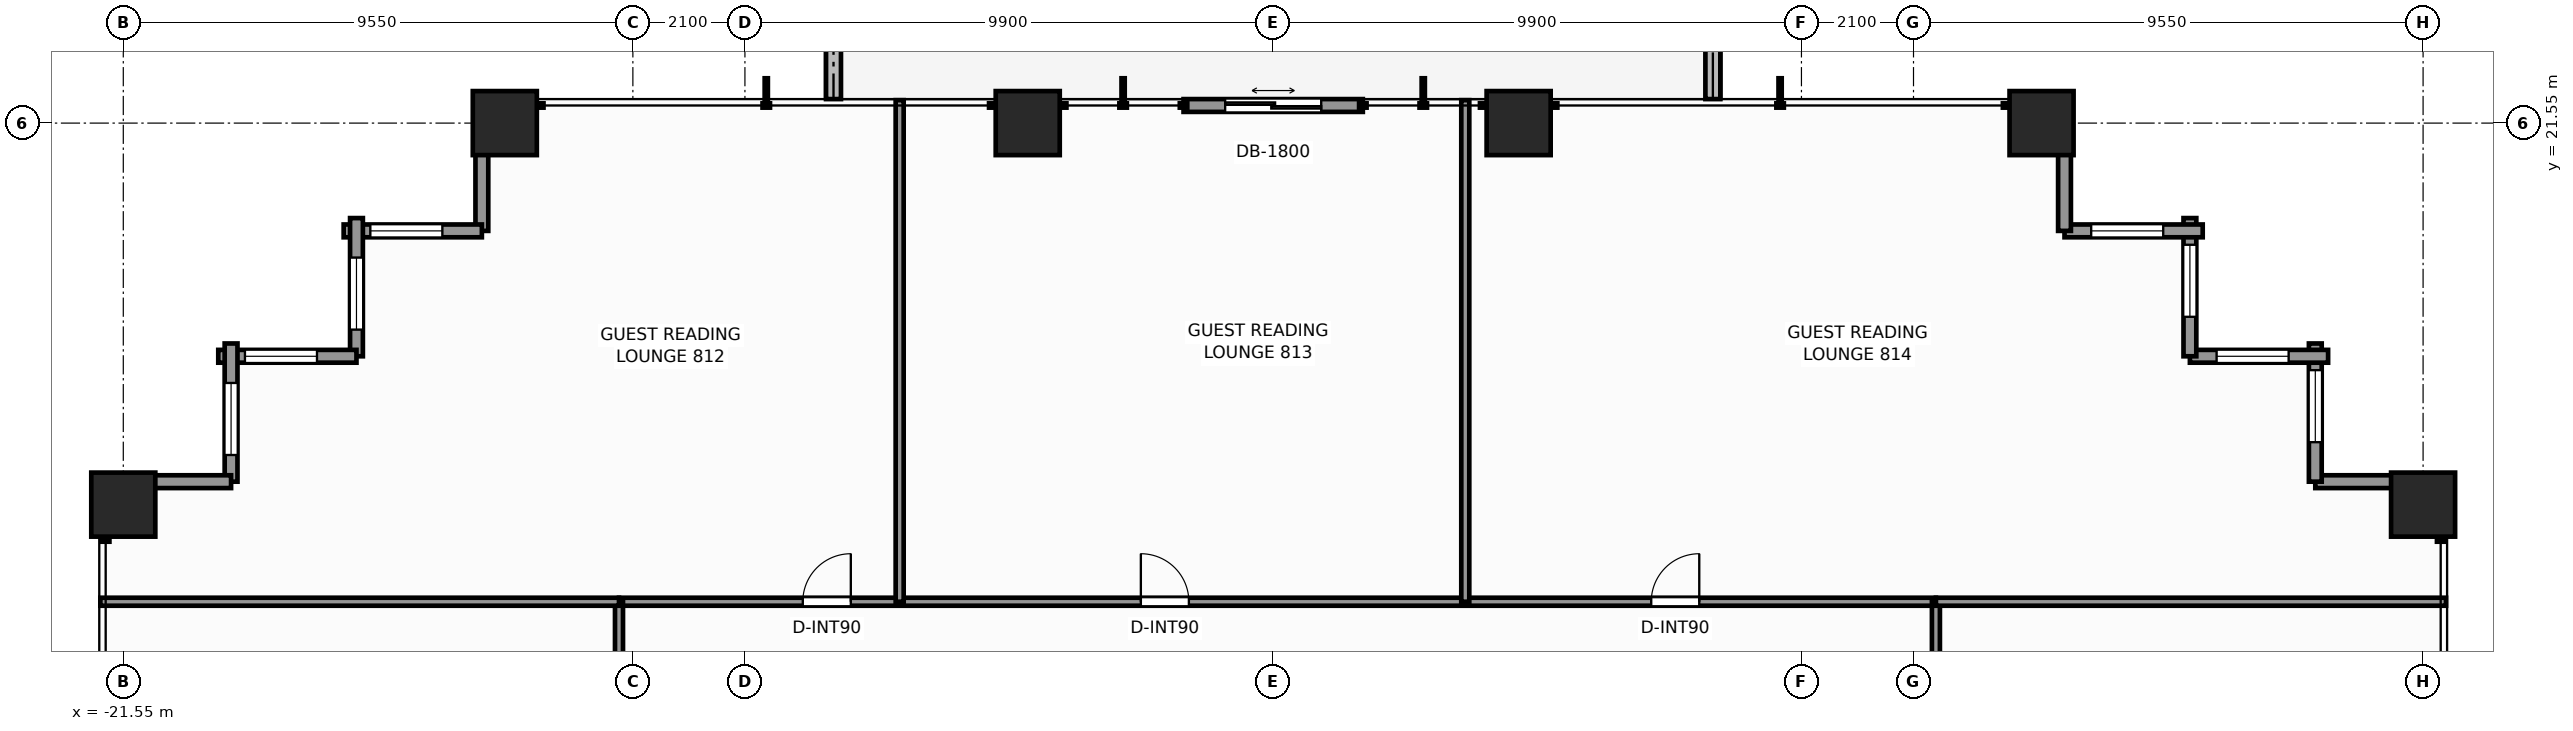
"""IFC4 building model, lengths in metres.
Left out: names, types, materials, properties, quantities, classifications, styles, units other than length and angle.
Written with IfcOpenShell. Run it as: python <this file> out.ifc"""

import sys

from ifc_helpers import new_model, si_unit, direction, frame, frame_2d, origin, origin_2d, place, context, subcontext, project, spatial, rectangle, extrude, element, fill, save


model = new_model("IFC4")
c1 = context("Model", 3, precision=1e-05, world=origin(), true_north=direction((0.0, 1.0)))
c2 = subcontext(c1, "Body", "Model", "MODEL_VIEW")
j1 = project(units=[si_unit("LENGTHUNIT", "METRE"), si_unit("PLANEANGLEUNIT", "RADIAN")], contexts=[c1])
p1 = place(None, origin())
s1 = spatial("IfcSite", under=j1, at=p1, CompositionType="ELEMENT")
p2 = place(p1, origin())
s2 = spatial("IfcBuilding", under=s1, at=p2, CompositionType="ELEMENT")
p3 = place(p2, frame((0.0, 0.0, 30.4)))
s3 = spatial("IfcBuildingStorey", under=s2, at=p3, CompositionType="ELEMENT", Elevation=30.4)
for number, where, z_axis, x_axis in (
    (1, (-14.4, 21.55, 0.0), (0.0, 0.0, 1.0), (1.0, 0.0, 0.0)),
    (2, (-4.6, 21.55, 0.0), (0.0, 0.0, 1.0), (1.0, 0.0, 0.0)),
    (3, (4.6, 21.55, 0.0), (0.0, 0.0, 1.0), (1.0, 0.0, 0.0)),
    (4, (14.4, 21.55, 0.0), (0.0, 0.0, 1.0), (1.0, 0.0, 0.0)),
    (5, (-21.55, 14.4, 0.0), (0.0, 0.0, 1.0), (1.0, 0.0, 0.0)),
    (6, (21.55, 14.4, 0.0), (0.0, 0.0, 1.0), (1.0, 0.0, 0.0)),
):
    element("IfcColumn", number, at=place(p3, frame(where, z_axis=z_axis, x_axis=x_axis)), inside=s3, PredefinedType="COLUMN", context=c2, shape_type="SweptSolid", body=[
        extrude(rectangle(XDim=1.2, YDim=1.2, at=origin_2d()), origin(), (0.0, 0.0, 1.0), 3.3),
    ])
p4 = place(p3, frame((8.24, 22.0, -0.06), z_axis=(0.0, 0.0, 1.0), x_axis=(0.0, 1.0, 0.0)))
e7 = element("IfcWall", 7, at=p4, inside=s3, PredefinedType="PARAPET", context=c2, shape_type="SweptSolid", body=[
    extrude(rectangle(XDim=2.34, YDim=0.28, at=frame_2d((1.17, 0.0))), origin(), (0.0, 0.0, 1.0), 0.42),
])
p5 = place(p3, frame((-8.24, 25.367, -0.06), z_axis=(0.0, 0.0, 1.0), x_axis=(0.0, -1.0, 0.0)))
e8 = element("IfcWall", 8, at=p5, inside=s3, PredefinedType="PARAPET", context=c2, shape_type="SweptSolid", body=[
    extrude(rectangle(XDim=3.367, YDim=0.28, at=frame_2d((1.684, 0.0))), origin(), (0.0, 0.0, 1.0), 0.42),
])
p6 = place(p3, frame((19.53, 14.83, 0.0), z_axis=(0.0, 0.0, 1.0), x_axis=(1.0, 0.0, 0.0)))
e9 = element("IfcWall", 9, at=p6, inside=s3, PredefinedType="STANDARD", context=c2, shape_type="SweptSolid", body=[
    extrude(rectangle(XDim=2.59, YDim=0.24, at=frame_2d((1.295, 0.0))), origin(), (0.0, 0.0, 1.0), 2.439),
])
p7 = place(p3, frame((19.53, 17.42, 0.0), z_axis=(0.0, 0.0, 1.0), x_axis=(0.0, -1.0, 0.0)))
e10 = element("IfcWall", 10, at=p7, inside=s3, PredefinedType="STANDARD", context=c2, shape_type="SweptSolid", body=[
    extrude(rectangle(XDim=2.59, YDim=0.24, at=frame_2d((1.295, 0.0))), origin(), (0.0, 0.0, 1.0), 2.439),
])
p8 = place(p7, frame((0.5, 0.0, 0.65)))
e11 = element("IfcOpeningElement", 11, at=p8, cuts=e10, PredefinedType="OPENING", context=c2, shape_type="SweptSolid", body=[
    extrude(rectangle(XDim=1.35, YDim=1.55, at=frame_2d((0.675, 0.775))), frame((0.0, 0.13, 0.0), z_axis=(0.0, -1.0, 0.0), x_axis=(1.0, 0.0, 0.0)), (0.0, 0.0, 1.0), 0.26),
])
p9 = place(p3, frame((17.18, 17.18, 0.0), z_axis=(0.0, 0.0, 1.0), x_axis=(1.0, 0.0, 0.0)))
e12 = element("IfcWall", 12, at=p9, inside=s3, PredefinedType="STANDARD", context=c2, shape_type="SweptSolid", body=[
    extrude(rectangle(XDim=2.59, YDim=0.24, at=frame_2d((1.295, 0.0))), origin(), (0.0, 0.0, 1.0), 2.439),
])
p10 = place(p9, frame((0.5, 0.0, 0.65)))
e13 = element("IfcOpeningElement", 13, at=p10, cuts=e12, PredefinedType="OPENING", context=c2, shape_type="SweptSolid", body=[
    extrude(rectangle(XDim=1.35, YDim=1.55, at=frame_2d((0.675, 0.775))), frame((0.0, 0.13, 0.0), z_axis=(0.0, -1.0, 0.0), x_axis=(1.0, 0.0, 0.0)), (0.0, 0.0, 1.0), 0.26),
])
p11 = place(p3, frame((17.18, 19.77, 0.0), z_axis=(0.0, 0.0, 1.0), x_axis=(0.0, -1.0, 0.0)))
e14 = element("IfcWall", 14, at=p11, inside=s3, PredefinedType="STANDARD", context=c2, shape_type="SweptSolid", body=[
    extrude(rectangle(XDim=2.59, YDim=0.24, at=frame_2d((1.295, 0.0))), origin(), (0.0, 0.0, 1.0), 2.439),
])
p12 = place(p11, frame((0.5, 0.0, 0.65)))
e15 = element("IfcOpeningElement", 15, at=p12, cuts=e14, PredefinedType="OPENING", context=c2, shape_type="SweptSolid", body=[
    extrude(rectangle(XDim=1.35, YDim=1.55, at=frame_2d((0.675, 0.775))), frame((0.0, 0.13, 0.0), z_axis=(0.0, -1.0, 0.0), x_axis=(1.0, 0.0, 0.0)), (0.0, 0.0, 1.0), 0.26),
])
p13 = place(p3, frame((14.83, 19.53, 0.0), z_axis=(0.0, 0.0, 1.0), x_axis=(1.0, 0.0, 0.0)))
e16 = element("IfcWall", 16, at=p13, inside=s3, PredefinedType="STANDARD", context=c2, shape_type="SweptSolid", body=[
    extrude(rectangle(XDim=2.59, YDim=0.24, at=frame_2d((1.295, 0.0))), origin(), (0.0, 0.0, 1.0), 2.439),
])
p14 = place(p13, frame((0.5, 0.0, 0.65)))
e17 = element("IfcOpeningElement", 17, at=p14, cuts=e16, PredefinedType="OPENING", context=c2, shape_type="SweptSolid", body=[
    extrude(rectangle(XDim=1.35, YDim=1.55, at=frame_2d((0.675, 0.775))), frame((0.0, 0.13, 0.0), z_axis=(0.0, -1.0, 0.0), x_axis=(1.0, 0.0, 0.0)), (0.0, 0.0, 1.0), 0.26),
])
p15 = place(p3, frame((14.83, 22.12, 0.0), z_axis=(0.0, 0.0, 1.0), x_axis=(0.0, -1.0, 0.0)))
e18 = element("IfcWall", 18, at=p15, inside=s3, PredefinedType="STANDARD", context=c2, shape_type="SweptSolid", body=[
    extrude(rectangle(XDim=2.59, YDim=0.24, at=frame_2d((1.295, 0.0))), origin(), (0.0, 0.0, 1.0), 2.439),
])
p16 = place(p3, frame((-1.68, 21.88, 0.0), z_axis=(0.0, 0.0, 1.0), x_axis=(1.0, 0.0, 0.0)))
e19 = element("IfcWall", 19, at=p16, inside=s3, PredefinedType="STANDARD", context=c2, shape_type="SweptSolid", body=[
    extrude(rectangle(XDim=3.36, YDim=0.24, at=frame_2d((1.68, 0.0))), origin(), (0.0, 0.0, 1.0), 3.06),
])
p17 = place(p16, frame((0.78, 0.0, 0.0)))
e20 = element("IfcOpeningElement", 20, at=p17, cuts=e19, PredefinedType="OPENING", context=c2, shape_type="SweptSolid", body=[
    extrude(rectangle(XDim=1.8, YDim=2.2, at=frame_2d((0.9, 1.1))), frame((0.0, 0.13, 0.0), z_axis=(0.0, -1.0, 0.0), x_axis=(1.0, 0.0, 0.0)), (0.0, 0.0, 1.0), 0.26),
])
p18 = place(p3, frame((-14.83, 19.53, 0.0), z_axis=(0.0, 0.0, 1.0), x_axis=(0.0, 1.0, 0.0)))
e21 = element("IfcWall", 21, at=p18, inside=s3, PredefinedType="STANDARD", context=c2, shape_type="SweptSolid", body=[
    extrude(rectangle(XDim=2.59, YDim=0.24, at=frame_2d((1.295, 0.0))), origin(), (0.0, 0.0, 1.0), 2.439),
])
p19 = place(p3, frame((-17.42, 19.53, 0.0), z_axis=(0.0, 0.0, 1.0), x_axis=(1.0, 0.0, 0.0)))
e22 = element("IfcWall", 22, at=p19, inside=s3, PredefinedType="STANDARD", context=c2, shape_type="SweptSolid", body=[
    extrude(rectangle(XDim=2.59, YDim=0.24, at=frame_2d((1.295, 0.0))), origin(), (0.0, 0.0, 1.0), 2.439),
])
p20 = place(p19, frame((0.5, 0.0, 0.65)))
e23 = element("IfcOpeningElement", 23, at=p20, cuts=e22, PredefinedType="OPENING", context=c2, shape_type="SweptSolid", body=[
    extrude(rectangle(XDim=1.35, YDim=1.55, at=frame_2d((0.675, 0.775))), frame((0.0, 0.13, 0.0), z_axis=(0.0, -1.0, 0.0), x_axis=(1.0, 0.0, 0.0)), (0.0, 0.0, 1.0), 0.26),
])
p21 = place(p3, frame((-17.18, 17.18, 0.0), z_axis=(0.0, 0.0, 1.0), x_axis=(0.0, 1.0, 0.0)))
e24 = element("IfcWall", 24, at=p21, inside=s3, PredefinedType="STANDARD", context=c2, shape_type="SweptSolid", body=[
    extrude(rectangle(XDim=2.59, YDim=0.24, at=frame_2d((1.295, 0.0))), origin(), (0.0, 0.0, 1.0), 2.439),
])
p22 = place(p21, frame((0.5, 0.0, 0.65)))
e25 = element("IfcOpeningElement", 25, at=p22, cuts=e24, PredefinedType="OPENING", context=c2, shape_type="SweptSolid", body=[
    extrude(rectangle(XDim=1.35, YDim=1.55, at=frame_2d((0.675, 0.775))), frame((0.0, 0.13, 0.0), z_axis=(0.0, -1.0, 0.0), x_axis=(1.0, 0.0, 0.0)), (0.0, 0.0, 1.0), 0.26),
])
p23 = place(p3, frame((-19.77, 17.18, 0.0), z_axis=(0.0, 0.0, 1.0), x_axis=(1.0, 0.0, 0.0)))
e26 = element("IfcWall", 26, at=p23, inside=s3, PredefinedType="STANDARD", context=c2, shape_type="SweptSolid", body=[
    extrude(rectangle(XDim=2.59, YDim=0.24, at=frame_2d((1.295, 0.0))), origin(), (0.0, 0.0, 1.0), 2.439),
])
p24 = place(p23, frame((0.5, 0.0, 0.65)))
e27 = element("IfcOpeningElement", 27, at=p24, cuts=e26, PredefinedType="OPENING", context=c2, shape_type="SweptSolid", body=[
    extrude(rectangle(XDim=1.35, YDim=1.55, at=frame_2d((0.675, 0.775))), frame((0.0, 0.13, 0.0), z_axis=(0.0, -1.0, 0.0), x_axis=(1.0, 0.0, 0.0)), (0.0, 0.0, 1.0), 0.26),
])
p25 = place(p3, frame((-19.53, 14.83, 0.0), z_axis=(0.0, 0.0, 1.0), x_axis=(0.0, 1.0, 0.0)))
e28 = element("IfcWall", 28, at=p25, inside=s3, PredefinedType="STANDARD", context=c2, shape_type="SweptSolid", body=[
    extrude(rectangle(XDim=2.59, YDim=0.24, at=frame_2d((1.295, 0.0))), origin(), (0.0, 0.0, 1.0), 2.439),
])
p26 = place(p25, frame((0.5, 0.0, 0.65)))
e29 = element("IfcOpeningElement", 29, at=p26, cuts=e28, PredefinedType="OPENING", context=c2, shape_type="SweptSolid", body=[
    extrude(rectangle(XDim=1.35, YDim=1.55, at=frame_2d((0.675, 0.775))), frame((0.0, 0.13, 0.0), z_axis=(0.0, -1.0, 0.0), x_axis=(1.0, 0.0, 0.0)), (0.0, 0.0, 1.0), 0.26),
])
p27 = place(p3, frame((-22.12, 14.83, 0.0), z_axis=(0.0, 0.0, 1.0), x_axis=(1.0, 0.0, 0.0)))
e30 = element("IfcWall", 30, at=p27, inside=s3, PredefinedType="STANDARD", context=c2, shape_type="SweptSolid", body=[
    extrude(rectangle(XDim=2.59, YDim=0.24, at=frame_2d((1.295, 0.0))), origin(), (0.0, 0.0, 1.0), 2.439),
])
p28 = place(p3, frame((-12.26, 12.58, 0.0), z_axis=(0.0, 0.0, 1.0), x_axis=(1.0, 0.0, 0.0)))
e31 = element("IfcWall", 31, at=p28, inside=s3, PredefinedType="PARTITIONING", context=c2, shape_type="SweptSolid", body=[
    extrude(rectangle(XDim=24.68, YDim=0.15, at=frame_2d((12.34, 0.0))), origin(), (0.0, 0.0, 1.0), 2.272),
])
p29 = place(p28, frame((3.444, 0.0, 0.0)))
e32 = element("IfcOpeningElement", 32, at=p29, cuts=e31, PredefinedType="OPENING", context=c2, shape_type="SweptSolid", body=[
    extrude(rectangle(XDim=0.9, YDim=2.06, at=frame_2d((0.45, 1.03))), frame((0.0, 0.085, 0.0), z_axis=(0.0, -1.0, 0.0), x_axis=(1.0, 0.0, 0.0)), (0.0, 0.0, 1.0), 0.17),
])
p30 = place(p28, frame((9.78, 0.0, 0.0)))
e33 = element("IfcOpeningElement", 33, at=p30, cuts=e31, PredefinedType="OPENING", context=c2, shape_type="SweptSolid", body=[
    extrude(rectangle(XDim=0.9, YDim=2.06, at=frame_2d((0.45, 1.03))), frame((0.0, 0.085, 0.0), z_axis=(0.0, -1.0, 0.0), x_axis=(1.0, 0.0, 0.0)), (0.0, 0.0, 1.0), 0.17),
])
p31 = place(p28, frame((19.345, 0.0, 0.0)))
e34 = element("IfcOpeningElement", 34, at=p31, cuts=e31, PredefinedType="OPENING", context=c2, shape_type="SweptSolid", body=[
    extrude(rectangle(XDim=0.9, YDim=2.06, at=frame_2d((0.45, 1.03))), frame((0.0, 0.085, 0.0), z_axis=(0.0, -1.0, 0.0), x_axis=(1.0, 0.0, 0.0)), (0.0, 0.0, 1.0), 0.17),
])
p32 = place(p3, frame((-12.26, -12.26, 0.0), z_axis=(0.0, 0.0, 1.0), x_axis=(0.0, 1.0, 0.0)))
e35 = element("IfcWall", 35, at=p32, inside=s3, PredefinedType="PARTITIONING", context=c2, shape_type="SweptSolid", body=[
    extrude(rectangle(XDim=24.84, YDim=0.15, at=frame_2d((12.42, 0.0))), origin(), (0.0, 0.0, 1.0), 2.272),
])
p33 = place(p32, frame((4.395, 0.0, 0.0)))
e36 = element("IfcOpeningElement", 36, at=p33, cuts=e35, PredefinedType="OPENING", context=c2, shape_type="SweptSolid", body=[
    extrude(rectangle(XDim=0.95, YDim=2.06, at=frame_2d((0.475, 1.03))), frame((0.0, 0.085, 0.0), z_axis=(0.0, -1.0, 0.0), x_axis=(1.0, 0.0, 0.0)), (0.0, 0.0, 1.0), 0.17),
])
p34 = place(p32, frame((13.815, 0.0, 0.0)))
e37 = element("IfcOpeningElement", 37, at=p34, cuts=e35, PredefinedType="OPENING", context=c2, shape_type="SweptSolid", body=[
    extrude(rectangle(XDim=0.95, YDim=2.06, at=frame_2d((0.475, 1.03))), frame((0.0, 0.085, 0.0), z_axis=(0.0, -1.0, 0.0), x_axis=(1.0, 0.0, 0.0)), (0.0, 0.0, 1.0), 0.17),
])
p35 = place(p32, frame((20.268, 0.0, 0.0)))
e38 = element("IfcOpeningElement", 38, at=p35, cuts=e35, PredefinedType="OPENING", context=c2, shape_type="SweptSolid", body=[
    extrude(rectangle(XDim=0.95, YDim=2.06, at=frame_2d((0.475, 1.03))), frame((0.0, 0.085, 0.0), z_axis=(0.0, -1.0, 0.0), x_axis=(1.0, 0.0, 0.0)), (0.0, 0.0, 1.0), 0.17),
])
p36 = place(p3, frame((12.42, -12.26, 0.0), z_axis=(0.0, 0.0, 1.0), x_axis=(0.0, 1.0, 0.0)))
e39 = element("IfcWall", 39, at=p36, inside=s3, PredefinedType="PARTITIONING", context=c2, shape_type="SweptSolid", body=[
    extrude(rectangle(XDim=24.84, YDim=0.15, at=frame_2d((12.42, 0.0))), origin(), (0.0, 0.0, 1.0), 2.272),
])
p37 = place(p36, frame((4.099, 0.0, 0.0)))
e40 = element("IfcOpeningElement", 40, at=p37, cuts=e39, PredefinedType="OPENING", context=c2, shape_type="SweptSolid", body=[
    extrude(rectangle(XDim=0.95, YDim=2.06, at=frame_2d((0.475, 1.03))), frame((0.0, 0.085, 0.0), z_axis=(0.0, -1.0, 0.0), x_axis=(1.0, 0.0, 0.0)), (0.0, 0.0, 1.0), 0.17),
])
p38 = place(p36, frame((13.577, 0.0, 0.0)))
e41 = element("IfcOpeningElement", 41, at=p38, cuts=e39, PredefinedType="OPENING", context=c2, shape_type="SweptSolid", body=[
    extrude(rectangle(XDim=0.95, YDim=2.06, at=frame_2d((0.475, 1.03))), frame((0.0, 0.085, 0.0), z_axis=(0.0, -1.0, 0.0), x_axis=(1.0, 0.0, 0.0)), (0.0, 0.0, 1.0), 0.17),
])
p39 = place(p36, frame((19.692, 0.0, 0.0)))
e42 = element("IfcOpeningElement", 42, at=p39, cuts=e39, PredefinedType="OPENING", context=c2, shape_type="SweptSolid", body=[
    extrude(rectangle(XDim=0.95, YDim=2.06, at=frame_2d((0.475, 1.03))), frame((0.0, 0.085, 0.0), z_axis=(0.0, -1.0, 0.0), x_axis=(1.0, 0.0, 0.0)), (0.0, 0.0, 1.0), 0.17),
])
p40 = place(p3, frame((-21.98, 12.58, 0.0), z_axis=(0.0, 0.0, 1.0), x_axis=(1.0, 0.0, 0.0)))
e43 = element("IfcWall", 43, at=p40, inside=s3, PredefinedType="PARTITIONING", context=c2, shape_type="SweptSolid", body=[
    extrude(rectangle(XDim=9.72, YDim=0.15, at=frame_2d((4.86, 0.0))), origin(), (0.0, 0.0, 1.0), 2.272),
])
p41 = place(p3, frame((12.42, 12.58, 0.0), z_axis=(0.0, 0.0, 1.0), x_axis=(1.0, 0.0, 0.0)))
e44 = element("IfcWall", 44, at=p41, inside=s3, PredefinedType="PARTITIONING", context=c2, shape_type="SweptSolid", body=[
    extrude(rectangle(XDim=9.56, YDim=0.15, at=frame_2d((4.78, 0.0))), origin(), (0.0, 0.0, 1.0), 2.272),
])
for number, where, z_axis, x_axis in (
    (45, (-7.0, 12.58, 0.0), (0.0, 0.0, 1.0), (0.0, 1.0, 0.0)),
    (46, (3.6, 12.58, 0.0), (0.0, 0.0, 1.0), (0.0, 1.0, 0.0)),
):
    element("IfcWall", number, at=place(p3, frame(where, z_axis=z_axis, x_axis=x_axis)), inside=s3, PredefinedType="PARTITIONING", context=c2, shape_type="SweptSolid", body=[
        extrude(rectangle(XDim=9.4, YDim=0.15, at=frame_2d((4.7, 0.0))), origin(), (0.0, 0.0, 1.0), 2.429),
    ])
p42 = place(p8, origin())
e47 = element("IfcWindow", 47, at=p42, inside=s3, PartitioningType="SINGLE_PANEL", PredefinedType="WINDOW", context=c2, shape_type="SweptSolid", body=[
    extrude(rectangle(XDim=1.35, YDim=1.55, at=frame_2d((0.675, 0.775))), frame((0.0, 0.03, 0.0), z_axis=(0.0, -1.0, 0.0), x_axis=(1.0, 0.0, 0.0)), (0.0, 0.0, 1.0), 0.06),
])
fill(e11, e47)
p43 = place(p10, origin())
e48 = element("IfcWindow", 48, at=p43, inside=s3, PartitioningType="SINGLE_PANEL", PredefinedType="WINDOW", context=c2, shape_type="SweptSolid", body=[
    extrude(rectangle(XDim=1.35, YDim=1.55, at=frame_2d((0.675, 0.775))), frame((0.0, 0.03, 0.0), z_axis=(0.0, -1.0, 0.0), x_axis=(1.0, 0.0, 0.0)), (0.0, 0.0, 1.0), 0.06),
])
fill(e13, e48)
p44 = place(p12, origin())
e49 = element("IfcWindow", 49, at=p44, inside=s3, PartitioningType="SINGLE_PANEL", PredefinedType="WINDOW", context=c2, shape_type="SweptSolid", body=[
    extrude(rectangle(XDim=1.35, YDim=1.55, at=frame_2d((0.675, 0.775))), frame((0.0, 0.03, 0.0), z_axis=(0.0, -1.0, 0.0), x_axis=(1.0, 0.0, 0.0)), (0.0, 0.0, 1.0), 0.06),
])
fill(e15, e49)
p45 = place(p14, origin())
e50 = element("IfcWindow", 50, at=p45, inside=s3, PartitioningType="SINGLE_PANEL", PredefinedType="WINDOW", context=c2, shape_type="SweptSolid", body=[
    extrude(rectangle(XDim=1.35, YDim=1.55, at=frame_2d((0.675, 0.775))), frame((0.0, 0.03, 0.0), z_axis=(0.0, -1.0, 0.0), x_axis=(1.0, 0.0, 0.0)), (0.0, 0.0, 1.0), 0.06),
])
fill(e17, e50)
p46 = place(p17, origin())
e51 = element("IfcDoor", 51, at=p46, inside=s3, OperationType="DOUBLE_DOOR_SLIDING", PredefinedType="DOOR", context=c2, shape_type="SweptSolid", body=[
    extrude(rectangle(XDim=1.8, YDim=2.2, at=frame_2d((0.9, 1.1))), frame((0.0, 0.025, 0.0), z_axis=(0.0, -1.0, 0.0), x_axis=(1.0, 0.0, 0.0)), (0.0, 0.0, 1.0), 0.05),
])
fill(e20, e51)
p47 = place(p20, origin())
e52 = element("IfcWindow", 52, at=p47, inside=s3, PartitioningType="SINGLE_PANEL", PredefinedType="WINDOW", context=c2, shape_type="SweptSolid", body=[
    extrude(rectangle(XDim=1.35, YDim=1.55, at=frame_2d((0.675, 0.775))), frame((0.0, 0.03, 0.0), z_axis=(0.0, -1.0, 0.0), x_axis=(1.0, 0.0, 0.0)), (0.0, 0.0, 1.0), 0.06),
])
fill(e23, e52)
p48 = place(p22, origin())
e53 = element("IfcWindow", 53, at=p48, inside=s3, PartitioningType="SINGLE_PANEL", PredefinedType="WINDOW", context=c2, shape_type="SweptSolid", body=[
    extrude(rectangle(XDim=1.35, YDim=1.55, at=frame_2d((0.675, 0.775))), frame((0.0, 0.03, 0.0), z_axis=(0.0, -1.0, 0.0), x_axis=(1.0, 0.0, 0.0)), (0.0, 0.0, 1.0), 0.06),
])
fill(e25, e53)
p49 = place(p24, origin())
e54 = element("IfcWindow", 54, at=p49, inside=s3, PartitioningType="SINGLE_PANEL", PredefinedType="WINDOW", context=c2, shape_type="SweptSolid", body=[
    extrude(rectangle(XDim=1.35, YDim=1.55, at=frame_2d((0.675, 0.775))), frame((0.0, 0.03, 0.0), z_axis=(0.0, -1.0, 0.0), x_axis=(1.0, 0.0, 0.0)), (0.0, 0.0, 1.0), 0.06),
])
fill(e27, e54)
p50 = place(p26, origin())
e55 = element("IfcWindow", 55, at=p50, inside=s3, PartitioningType="SINGLE_PANEL", PredefinedType="WINDOW", context=c2, shape_type="SweptSolid", body=[
    extrude(rectangle(XDim=1.35, YDim=1.55, at=frame_2d((0.675, 0.775))), frame((0.0, 0.03, 0.0), z_axis=(0.0, -1.0, 0.0), x_axis=(1.0, 0.0, 0.0)), (0.0, 0.0, 1.0), 0.06),
])
fill(e29, e55)
p51 = place(p29, origin())
e56 = element("IfcDoor", 56, at=p51, inside=s3, OperationType="SINGLE_SWING_RIGHT", PredefinedType="DOOR", context=c2, shape_type="SweptSolid", body=[
    extrude(rectangle(XDim=0.9, YDim=2.06, at=frame_2d((0.45, 1.03))), frame((0.0, 0.025, 0.0), z_axis=(0.0, -1.0, 0.0), x_axis=(1.0, 0.0, 0.0)), (0.0, 0.0, 1.0), 0.05),
])
fill(e32, e56)
p52 = place(p30, origin())
e57 = element("IfcDoor", 57, at=p52, inside=s3, OperationType="SINGLE_SWING_LEFT", PredefinedType="DOOR", context=c2, shape_type="SweptSolid", body=[
    extrude(rectangle(XDim=0.9, YDim=2.06, at=frame_2d((0.45, 1.03))), frame((0.0, 0.025, 0.0), z_axis=(0.0, -1.0, 0.0), x_axis=(1.0, 0.0, 0.0)), (0.0, 0.0, 1.0), 0.05),
])
fill(e33, e57)
p53 = place(p31, origin())
e58 = element("IfcDoor", 58, at=p53, inside=s3, OperationType="SINGLE_SWING_RIGHT", PredefinedType="DOOR", context=c2, shape_type="SweptSolid", body=[
    extrude(rectangle(XDim=0.9, YDim=2.06, at=frame_2d((0.45, 1.03))), frame((0.0, 0.025, 0.0), z_axis=(0.0, -1.0, 0.0), x_axis=(1.0, 0.0, 0.0)), (0.0, 0.0, 1.0), 0.05),
])
fill(e34, e58)
save(model, sys.argv[1])
